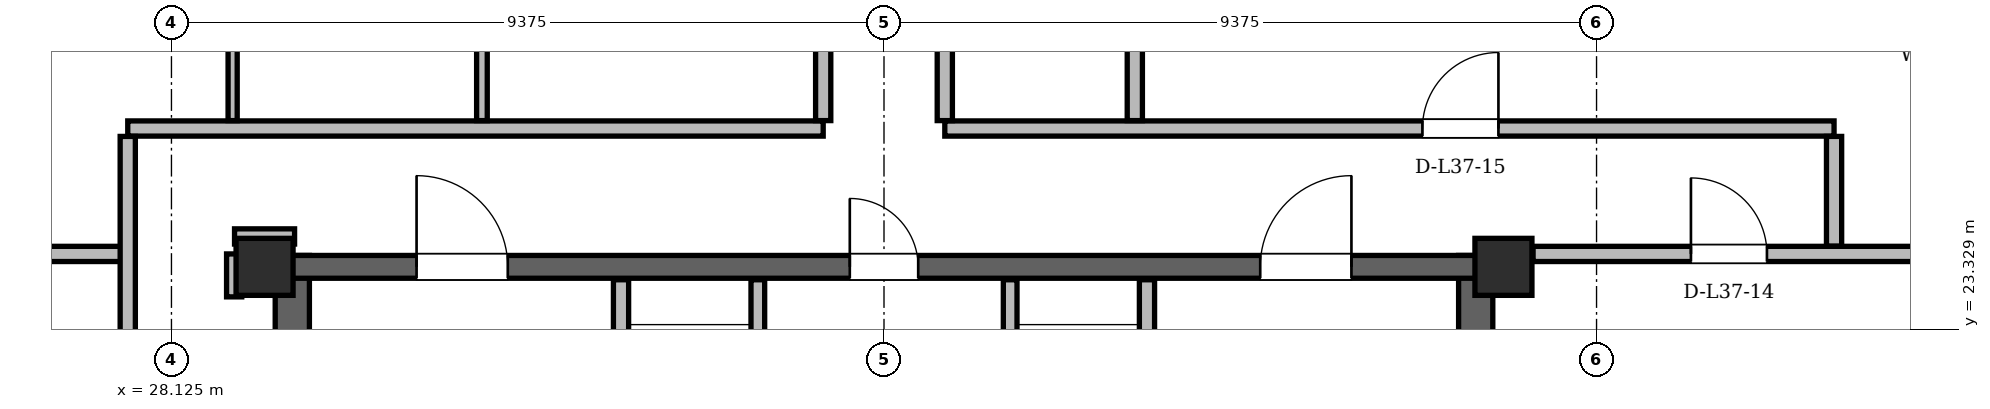
"""IFC4 building model, lengths in metres.
Left out: names, types, materials, properties, quantities, classifications, styles, units other than length and angle.
Written with IfcOpenShell. Run it as: python <this file> out.ifc"""

import sys

from ifc_helpers import new_model, si_unit, direction, frame, frame_2d, origin, origin_2d, place, context, subcontext, project, spatial, rectangle, hollow_rectangle, extrude, element, fill, save


model = new_model("IFC4")
c1 = context("Model", 3, precision=1e-05, world=origin(), true_north=direction((0.0, 1.0)))
c2 = subcontext(c1, "Body", "Model", "MODEL_VIEW")
j1 = project(units=[si_unit("LENGTHUNIT", "METRE"), si_unit("PLANEANGLEUNIT", "RADIAN")], contexts=[c1])
p1 = place(None, origin())
s1 = spatial("IfcSite", under=j1, at=p1, CompositionType="ELEMENT")
p2 = place(p1, origin())
s2 = spatial("IfcBuilding", under=s1, at=p2, CompositionType="ELEMENT")
p3 = place(p2, frame((0.0, 0.0, 142.2)))
s3 = spatial("IfcBuildingStorey", under=s2, at=p3, CompositionType="ELEMENT", Elevation=142.2)
for number, where, z_axis, x_axis in (
    (1, (45.65, 24.15, 0.0), (0.0, 0.0, 1.0), (1.0, 0.0, 0.0)),
    (2, (29.35, 24.15, 0.0), (0.0, 0.0, 1.0), (1.0, 0.0, 0.0)),
):
    element("IfcColumn", number, at=place(p3, frame(where, z_axis=z_axis, x_axis=x_axis)), inside=s3, PredefinedType="COLUMN", context=c2, shape_type="SweptSolid", body=[
        extrude(hollow_rectangle(XDim=0.75, YDim=0.75, WallThickness=0.06, at=origin_2d()), origin(), (0.0, 0.0, 1.0), 3.6),
    ])
for number, where, z_axis, x_axis in (
    (3, (29.715, 11.0, 0.0), (0.0, 0.0, 1.0), (0.0, 1.0, 0.0)),
    (4, (45.285, 11.0, 0.0), (0.0, 0.0, 1.0), (0.0, 1.0, 0.0)),
):
    element("IfcWall", number, at=place(p3, frame(where, z_axis=z_axis, x_axis=x_axis)), inside=s3, PredefinedType="SHEAR", context=c2, shape_type="SweptSolid", body=[
        extrude(rectangle(XDim=13.3, YDim=0.45, at=frame_2d((6.65, 0.0))), origin(), (0.0, 0.0, 1.0), 3.36),
    ])
p4 = place(p3, frame((29.65, 24.15, 0.0), z_axis=(0.0, 0.0, 1.0), x_axis=(1.0, 0.0, 0.0)))
e5 = element("IfcWall", 5, at=p4, inside=s3, PredefinedType="SHEAR", context=c2, shape_type="SweptSolid", body=[
    extrude(rectangle(XDim=15.7, YDim=0.3, at=frame_2d((7.85, 0.0))), origin(), (0.0, 0.0, 1.0), 3.36),
])
p5 = place(p4, frame((1.7, 0.0, 0.0)))
e6 = element("IfcOpeningElement", 6, at=p5, cuts=e5, PredefinedType="OPENING", context=c2, shape_type="SweptSolid", body=[
    extrude(rectangle(XDim=1.2, YDim=2.2, at=frame_2d((0.6, 1.1))), frame((0.0, 0.15, 0.0), z_axis=(0.0, -1.0, 0.0), x_axis=(1.0, 0.0, 0.0)), (0.0, 0.0, 1.0), 0.3),
])
p6 = place(p4, frame((12.8, 0.0, 0.0)))
e7 = element("IfcOpeningElement", 7, at=p6, cuts=e5, PredefinedType="OPENING", context=c2, shape_type="SweptSolid", body=[
    extrude(rectangle(XDim=1.2, YDim=2.2, at=frame_2d((0.6, 1.1))), frame((0.0, 0.15, 0.0), z_axis=(0.0, -1.0, 0.0), x_axis=(1.0, 0.0, 0.0)), (0.0, 0.0, 1.0), 0.3),
])
p7 = place(p4, frame((7.4, 0.0, 0.0)))
e8 = element("IfcOpeningElement", 8, at=p7, cuts=e5, PredefinedType="OPENING", context=c2, shape_type="SweptSolid", body=[
    extrude(rectangle(XDim=0.9, YDim=2.05, at=frame_2d((0.45, 1.025))), frame((0.0, 0.15, 0.0), z_axis=(0.0, -1.0, 0.0), x_axis=(1.0, 0.0, 0.0)), (0.0, 0.0, 1.0), 0.3),
])
p8 = place(p3, frame((60.103, 12.75, 0.0), z_axis=(0.0, 0.0, 1.0), x_axis=(-0.500002563111, 0.866023923966, 0.0)))
e9 = element("IfcWall", 9, at=p8, inside=s3, PredefinedType="SOLIDWALL", context=c2, shape_type="SweptSolid", body=[
    extrude(rectangle(XDim=35.334, YDim=0.34, at=frame_2d((17.667, 0.0))), origin(), (0.0, 0.0, 1.0), 2.58),
])
p9 = place(p8, frame((8.034, 0.0, 0.0)))
e10 = element("IfcOpeningElement", 10, at=p9, cuts=e9, PredefinedType="OPENING", context=c2, shape_type="SweptSolid", body=[
    extrude(rectangle(XDim=1.5, YDim=2.2, at=frame_2d((0.75, 1.1))), frame((0.0, 0.17, 0.0), z_axis=(0.0, -1.0, 0.0), x_axis=(1.0, 0.0, 0.0)), (0.0, 0.0, 1.0), 0.34),
])
p10 = place(p8, frame((27.255, 0.0, 0.0)))
e11 = element("IfcOpeningElement", 11, at=p10, cuts=e9, PredefinedType="OPENING", context=c2, shape_type="SweptSolid", body=[
    extrude(rectangle(XDim=1.5, YDim=2.2, at=frame_2d((0.75, 1.1))), frame((0.0, 0.17, 0.0), z_axis=(0.0, -1.0, 0.0), x_axis=(1.0, 0.0, 0.0)), (0.0, 0.0, 1.0), 0.34),
])
p11 = place(p8, frame((3.622, 0.0, 0.85)))
e12 = element("IfcOpeningElement", 12, at=p11, cuts=e9, PredefinedType="OPENING", context=c2, shape_type="SweptSolid", body=[
    extrude(rectangle(XDim=1.2, YDim=1.48, at=frame_2d((0.6, 0.74))), frame((0.0, 0.17, 0.0), z_axis=(0.0, -1.0, 0.0), x_axis=(1.0, 0.0, 0.0)), (0.0, 0.0, 1.0), 0.34),
])
p12 = place(p8, frame((11.8, 0.0, 0.85)))
e13 = element("IfcOpeningElement", 13, at=p12, cuts=e9, PredefinedType="OPENING", context=c2, shape_type="SweptSolid", body=[
    extrude(rectangle(XDim=1.2, YDim=1.48, at=frame_2d((0.6, 0.74))), frame((0.0, 0.17, 0.0), z_axis=(0.0, -1.0, 0.0), x_axis=(1.0, 0.0, 0.0)), (0.0, 0.0, 1.0), 0.34),
])
p13 = place(p8, frame((15.268, 0.0, 0.85)))
e14 = element("IfcOpeningElement", 14, at=p13, cuts=e9, PredefinedType="OPENING", context=c2, shape_type="SweptSolid", body=[
    extrude(rectangle(XDim=2.8, YDim=1.62, at=frame_2d((1.4, 0.81))), frame((0.0, 0.17, 0.0), z_axis=(0.0, -1.0, 0.0), x_axis=(1.0, 0.0, 0.0)), (0.0, 0.0, 1.0), 0.34),
])
p14 = place(p8, frame((25.555, 0.0, 0.85)))
e15 = element("IfcOpeningElement", 15, at=p14, cuts=e9, PredefinedType="OPENING", context=c2, shape_type="SweptSolid", body=[
    extrude(rectangle(XDim=1.2, YDim=1.48, at=frame_2d((0.6, 0.74))), frame((0.0, 0.17, 0.0), z_axis=(0.0, -1.0, 0.0), x_axis=(1.0, 0.0, 0.0)), (0.0, 0.0, 1.0), 0.34),
])
p15 = place(p8, frame((32.219, 0.0, 0.85)))
e16 = element("IfcOpeningElement", 16, at=p15, cuts=e9, PredefinedType="OPENING", context=c2, shape_type="SweptSolid", body=[
    extrude(rectangle(XDim=2.0, YDim=1.62, at=frame_2d((1.0, 0.81))), frame((0.0, 0.17, 0.0), z_axis=(0.0, -1.0, 0.0), x_axis=(1.0, 0.0, 0.0)), (0.0, 0.0, 1.0), 0.34),
])
p16 = place(p3, frame((32.564, 43.35, 0.0), z_axis=(0.0, 0.0, 1.0), x_axis=(-0.500002563111, -0.866023923966, 0.0)))
e17 = element("IfcWall", 17, at=p16, inside=s3, PredefinedType="SOLIDWALL", context=c2, shape_type="SweptSolid", body=[
    extrude(rectangle(XDim=35.334, YDim=0.34, at=frame_2d((17.667, 0.0))), origin(), (0.0, 0.0, 1.0), 2.58),
])
p17 = place(p16, frame((8.034, 0.0, 0.0)))
e18 = element("IfcOpeningElement", 18, at=p17, cuts=e17, PredefinedType="OPENING", context=c2, shape_type="SweptSolid", body=[
    extrude(rectangle(XDim=1.5, YDim=2.2, at=frame_2d((0.75, 1.1))), frame((0.0, 0.17, 0.0), z_axis=(0.0, -1.0, 0.0), x_axis=(1.0, 0.0, 0.0)), (0.0, 0.0, 1.0), 0.34),
])
p18 = place(p16, frame((26.835, 0.0, 0.0)))
e19 = element("IfcOpeningElement", 19, at=p18, cuts=e17, PredefinedType="OPENING", context=c2, shape_type="SweptSolid", body=[
    extrude(rectangle(XDim=1.5, YDim=2.2, at=frame_2d((0.75, 1.1))), frame((0.0, 0.17, 0.0), z_axis=(0.0, -1.0, 0.0), x_axis=(1.0, 0.0, 0.0)), (0.0, 0.0, 1.0), 0.34),
])
p19 = place(p16, frame((22.185, 0.0, 0.85)))
e20 = element("IfcOpeningElement", 20, at=p19, cuts=e17, PredefinedType="OPENING", context=c2, shape_type="SweptSolid", body=[
    extrude(rectangle(XDim=1.2, YDim=1.48, at=frame_2d((0.6, 0.74))), frame((0.0, 0.17, 0.0), z_axis=(0.0, -1.0, 0.0), x_axis=(1.0, 0.0, 0.0)), (0.0, 0.0, 1.0), 0.34),
])
p20 = place(p16, frame((2.318, 0.0, 0.85)))
e21 = element("IfcOpeningElement", 21, at=p20, cuts=e17, PredefinedType="OPENING", context=c2, shape_type="SweptSolid", body=[
    extrude(rectangle(XDim=1.6, YDim=1.62, at=frame_2d((0.8, 0.81))), frame((0.0, 0.17, 0.0), z_axis=(0.0, -1.0, 0.0), x_axis=(1.0, 0.0, 0.0)), (0.0, 0.0, 1.0), 0.34),
])
p21 = place(p16, frame((12.959, 0.0, 0.85)))
e22 = element("IfcOpeningElement", 22, at=p21, cuts=e17, PredefinedType="OPENING", context=c2, shape_type="SweptSolid", body=[
    extrude(rectangle(XDim=3.0, YDim=1.62, at=frame_2d((1.5, 0.81))), frame((0.0, 0.17, 0.0), z_axis=(0.0, -1.0, 0.0), x_axis=(1.0, 0.0, 0.0)), (0.0, 0.0, 1.0), 0.34),
])
p22 = place(p16, frame((20.293, 0.0, 0.85)))
e23 = element("IfcOpeningElement", 23, at=p22, cuts=e17, PredefinedType="OPENING", context=c2, shape_type="SweptSolid", body=[
    extrude(rectangle(XDim=1.2, YDim=1.48, at=frame_2d((0.6, 0.74))), frame((0.0, 0.17, 0.0), z_axis=(0.0, -1.0, 0.0), x_axis=(1.0, 0.0, 0.0)), (0.0, 0.0, 1.0), 0.34),
])
p23 = place(p16, frame((33.535, 0.0, 0.85)))
e24 = element("IfcOpeningElement", 24, at=p23, cuts=e17, PredefinedType="OPENING", context=c2, shape_type="SweptSolid", body=[
    extrude(rectangle(XDim=1.2, YDim=1.48, at=frame_2d((0.6, 0.74))), frame((0.0, 0.17, 0.0), z_axis=(0.0, -1.0, 0.0), x_axis=(1.0, 0.0, 0.0)), (0.0, 0.0, 1.0), 0.34),
])
p24 = place(p3, frame((34.04, 19.48, 0.0), z_axis=(0.0, 0.0, 1.0), x_axis=(0.0, 1.0, 0.0)))
e25 = element("IfcWall", 25, at=p24, inside=s3, PredefinedType="PARTITIONING", context=c2, shape_type="SweptSolid", body=[
    extrude(rectangle(XDim=4.5, YDim=0.2, at=frame_2d((2.25, 0.0))), origin(), (0.0, 0.0, 1.0), 2.4),
])
p25 = place(p24, frame((2.12, 0.0, 0.0)))
e26 = element("IfcOpeningElement", 26, at=p25, cuts=e25, PredefinedType="OPENING", context=c2, shape_type="SweptSolid", body=[
    extrude(rectangle(XDim=1.1, YDim=2.2, at=frame_2d((0.55, 1.1))), frame((0.0, 0.1, 0.0), z_axis=(0.0, -1.0, 0.0), x_axis=(1.0, 0.0, 0.0)), (0.0, 0.0, 1.0), 0.2),
])
p26 = place(p3, frame((35.84, 20.96, 0.0), z_axis=(0.0, 0.0, 1.0), x_axis=(0.0, 1.0, 0.0)))
e27 = element("IfcWall", 27, at=p26, inside=s3, PredefinedType="PARTITIONING", context=c2, shape_type="SweptSolid", body=[
    extrude(rectangle(XDim=3.02, YDim=0.18, at=frame_2d((1.51, 0.0))), origin(), (0.0, 0.0, 1.0), 2.4),
])
p27 = place(p3, frame((40.96, 19.48, 0.0), z_axis=(0.0, 0.0, 1.0), x_axis=(0.0, 1.0, 0.0)))
e28 = element("IfcWall", 28, at=p27, inside=s3, PredefinedType="PARTITIONING", context=c2, shape_type="SweptSolid", body=[
    extrude(rectangle(XDim=4.5, YDim=0.2, at=frame_2d((2.25, 0.0))), origin(), (0.0, 0.0, 1.0), 2.4),
])
p28 = place(p27, frame((2.12, 0.0, 0.0)))
e29 = element("IfcOpeningElement", 29, at=p28, cuts=e28, PredefinedType="OPENING", context=c2, shape_type="SweptSolid", body=[
    extrude(rectangle(XDim=1.1, YDim=2.2, at=frame_2d((0.55, 1.1))), frame((0.0, 0.1, 0.0), z_axis=(0.0, -1.0, 0.0), x_axis=(1.0, 0.0, 0.0)), (0.0, 0.0, 1.0), 0.2),
])
p29 = place(p3, frame((39.16, 20.96, 0.0), z_axis=(0.0, 0.0, 1.0), x_axis=(0.0, 1.0, 0.0)))
e30 = element("IfcWall", 30, at=p29, inside=s3, PredefinedType="PARTITIONING", context=c2, shape_type="SweptSolid", body=[
    extrude(rectangle(XDim=3.02, YDim=0.18, at=frame_2d((1.51, 0.0))), origin(), (0.0, 0.0, 1.0), 2.4),
])
p30 = place(p3, frame((21.778, 24.32, 0.0), z_axis=(0.0, 0.0, 1.0), x_axis=(1.0, 0.0, 0.0)))
e31 = element("IfcWall", 31, at=p30, inside=s3, PredefinedType="PARTITIONING", context=c2, shape_type="SweptSolid", body=[
    extrude(rectangle(XDim=5.772, YDim=0.2, at=frame_2d((2.886, 0.0))), origin(), (0.0, 0.0, 1.0), 3.36),
])
p31 = place(p3, frame((46.04, 24.32, 0.0), z_axis=(0.0, 0.0, 1.0), x_axis=(1.0, 0.0, 0.0)))
e32 = element("IfcWall", 32, at=p31, inside=s3, PredefinedType="PARTITIONING", context=c2, shape_type="SweptSolid", body=[
    extrude(rectangle(XDim=7.182, YDim=0.2, at=frame_2d((3.591, 0.0))), origin(), (0.0, 0.0, 1.0), 3.36),
])
p32 = place(p31, frame((2.077, 0.0, 0.0)))
e33 = element("IfcOpeningElement", 33, at=p32, cuts=e32, PredefinedType="OPENING", context=c2, shape_type="SweptSolid", body=[
    extrude(rectangle(XDim=1.0, YDim=2.18, at=frame_2d((0.5, 1.09))), frame((0.0, 0.1, 0.0), z_axis=(0.0, -1.0, 0.0), x_axis=(1.0, 0.0, 0.0)), (0.0, 0.0, 1.0), 0.2),
])
p33 = place(p3, frame((28.955, 24.55, 0.0), z_axis=(0.0, 0.0, 1.0), x_axis=(1.0, 0.0, 0.0)))
e34 = element("IfcWall", 34, at=p33, inside=s3, PredefinedType="PARTITIONING", context=c2, shape_type="SweptSolid", body=[
    extrude(rectangle(XDim=0.79, YDim=0.2, at=frame_2d((0.395, 0.0))), origin(), (0.0, 0.0, 1.0), 2.822),
])
p34 = place(p3, frame((27.55, 25.97, 0.0), z_axis=(0.0, 0.0, 1.0), x_axis=(1.0, 0.0, 0.0)))
e35 = element("IfcWall", 35, at=p34, inside=s3, PredefinedType="PARTITIONING", context=c2, shape_type="SweptSolid", body=[
    extrude(rectangle(XDim=9.15, YDim=0.2, at=frame_2d((4.575, 0.0))), origin(), (0.0, 0.0, 1.0), 2.822),
])
p35 = place(p3, frame((38.3, 25.97, 0.0), z_axis=(0.0, 0.0, 1.0), x_axis=(1.0, 0.0, 0.0)))
e36 = element("IfcWall", 36, at=p35, inside=s3, PredefinedType="PARTITIONING", context=c2, shape_type="SweptSolid", body=[
    extrude(rectangle(XDim=11.7, YDim=0.2, at=frame_2d((5.85, 0.0))), origin(), (0.0, 0.0, 1.0), 2.822),
])
p36 = place(p35, frame((6.284, 0.0, 0.0)))
e37 = element("IfcOpeningElement", 37, at=p36, cuts=e36, PredefinedType="OPENING", context=c2, shape_type="SweptSolid", body=[
    extrude(rectangle(XDim=1.0, YDim=2.18, at=frame_2d((0.5, 1.09))), frame((0.0, 0.1, 0.0), z_axis=(0.0, -1.0, 0.0), x_axis=(1.0, 0.0, 0.0)), (0.0, 0.0, 1.0), 0.2),
])
p37 = place(p3, frame((27.55, 18.554, 0.0), z_axis=(0.0, 0.0, 1.0), x_axis=(0.0, 1.0, 0.0)))
e38 = element("IfcWall", 38, at=p37, inside=s3, PredefinedType="PARTITIONING", context=c2, shape_type="SweptSolid", body=[
    extrude(rectangle(XDim=7.312, YDim=0.2, at=frame_2d((3.656, 0.0))), origin(), (0.0, 0.0, 1.0), 3.36),
])
p38 = place(p3, frame((28.93, 26.074, 0.0), z_axis=(0.0, 0.0, 1.0), x_axis=(0.0, 1.0, 0.0)))
e39 = element("IfcWall", 39, at=p38, inside=s3, PredefinedType="PARTITIONING", context=c2, shape_type="SweptSolid", body=[
    extrude(rectangle(XDim=1.822, YDim=0.12, at=frame_2d((0.911, 0.0))), origin(), (0.0, 0.0, 1.0), 3.36),
])
p39 = place(p3, frame((28.95, 23.755, 0.0), z_axis=(0.0, 0.0, 1.0), x_axis=(0.0, 1.0, 0.0)))
e40 = element("IfcWall", 40, at=p39, inside=s3, PredefinedType="PARTITIONING", context=c2, shape_type="SweptSolid", body=[
    extrude(rectangle(XDim=0.565, YDim=0.2, at=frame_2d((0.283, 0.0))), origin(), (0.0, 0.0, 1.0), 3.36),
])
p40 = place(p3, frame((32.21, 26.074, 0.0), z_axis=(0.0, 0.0, 1.0), x_axis=(0.0, 1.0, 0.0)))
e41 = element("IfcWall", 41, at=p40, inside=s3, PredefinedType="PARTITIONING", context=c2, shape_type="SweptSolid", body=[
    extrude(rectangle(XDim=1.822, YDim=0.14, at=frame_2d((0.911, 0.0))), origin(), (0.0, 0.0, 1.0), 3.36),
])
p41 = place(p3, frame((36.7, 26.074, 0.0), z_axis=(0.0, 0.0, 1.0), x_axis=(0.0, 1.0, 0.0)))
e42 = element("IfcWall", 42, at=p41, inside=s3, PredefinedType="PARTITIONING", context=c2, shape_type="SweptSolid", body=[
    extrude(rectangle(XDim=17.102, YDim=0.2, at=frame_2d((8.551, 0.0))), origin(), (0.0, 0.0, 1.0), 3.36),
])
p42 = place(p41, frame((7.042, 0.0, 0.0)))
e43 = element("IfcOpeningElement", 43, at=p42, cuts=e42, PredefinedType="OPENING", context=c2, shape_type="SweptSolid", body=[
    extrude(rectangle(XDim=1.0, YDim=2.18, at=frame_2d((0.5, 1.09))), frame((0.0, 0.1, 0.0), z_axis=(0.0, -1.0, 0.0), x_axis=(1.0, 0.0, 0.0)), (0.0, 0.0, 1.0), 0.2),
])
p43 = place(p3, frame((38.3, 26.074, 0.0), z_axis=(0.0, 0.0, 1.0), x_axis=(0.0, 1.0, 0.0)))
e44 = element("IfcWall", 44, at=p43, inside=s3, PredefinedType="PARTITIONING", context=c2, shape_type="SweptSolid", body=[
    extrude(rectangle(XDim=13.422, YDim=0.2, at=frame_2d((6.711, 0.0))), origin(), (0.0, 0.0, 1.0), 3.36),
])
p44 = place(p43, frame((8.528, 0.0, 0.0)))
e45 = element("IfcOpeningElement", 45, at=p44, cuts=e44, PredefinedType="OPENING", context=c2, shape_type="SweptSolid", body=[
    extrude(rectangle(XDim=1.0, YDim=2.18, at=frame_2d((0.5, 1.09))), frame((0.0, 0.1, 0.0), z_axis=(0.0, -1.0, 0.0), x_axis=(1.0, 0.0, 0.0)), (0.0, 0.0, 1.0), 0.2),
])
p45 = place(p3, frame((40.8, 26.074, 0.0), z_axis=(0.0, 0.0, 1.0), x_axis=(0.0, 1.0, 0.0)))
e46 = element("IfcWall", 46, at=p45, inside=s3, PredefinedType="PARTITIONING", context=c2, shape_type="SweptSolid", body=[
    extrude(rectangle(XDim=17.102, YDim=0.2, at=frame_2d((8.551, 0.0))), origin(), (0.0, 0.0, 1.0), 3.36),
])
p46 = place(p3, frame((50.0, 24.424, 0.0), z_axis=(0.0, 0.0, 1.0), x_axis=(0.0, 1.0, 0.0)))
e47 = element("IfcWall", 47, at=p46, inside=s3, PredefinedType="PARTITIONING", context=c2, shape_type="SweptSolid", body=[
    extrude(rectangle(XDim=1.442, YDim=0.2, at=frame_2d((0.721, 0.0))), origin(), (0.0, 0.0, 1.0), 3.36),
])
p47 = place(p5, origin())
e48 = element("IfcDoor", 48, at=p47, inside=s3, OperationType="SINGLE_SWING_LEFT", PredefinedType="DOOR", context=c2, shape_type="SweptSolid", body=[
    extrude(rectangle(XDim=1.2, YDim=2.2, at=frame_2d((0.6, 1.1))), frame((0.0, 0.025, 0.0), z_axis=(0.0, -1.0, 0.0), x_axis=(1.0, 0.0, 0.0)), (0.0, 0.0, 1.0), 0.05),
])
fill(e6, e48)
p48 = place(p6, origin())
e49 = element("IfcDoor", 49, at=p48, inside=s3, OperationType="SINGLE_SWING_RIGHT", PredefinedType="DOOR", context=c2, shape_type="SweptSolid", body=[
    extrude(rectangle(XDim=1.2, YDim=2.2, at=frame_2d((0.6, 1.1))), frame((0.0, 0.025, 0.0), z_axis=(0.0, -1.0, 0.0), x_axis=(1.0, 0.0, 0.0)), (0.0, 0.0, 1.0), 0.05),
])
fill(e7, e49)
p49 = place(p7, origin())
e50 = element("IfcDoor", 50, at=p49, inside=s3, OperationType="SINGLE_SWING_LEFT", PredefinedType="DOOR", context=c2, shape_type="SweptSolid", body=[
    extrude(rectangle(XDim=0.9, YDim=2.05, at=frame_2d((0.45, 1.025))), frame((0.0, 0.025, 0.0), z_axis=(0.0, -1.0, 0.0), x_axis=(1.0, 0.0, 0.0)), (0.0, 0.0, 1.0), 0.05),
])
fill(e8, e50)
p50 = place(p32, origin())
e51 = element("IfcDoor", 51, at=p50, inside=s3, OperationType="SINGLE_SWING_LEFT", PredefinedType="DOOR", context=c2, shape_type="SweptSolid", body=[
    extrude(rectangle(XDim=1.0, YDim=2.18, at=frame_2d((0.5, 1.09))), frame((0.0, 0.025, 0.0), z_axis=(0.0, -1.0, 0.0), x_axis=(1.0, 0.0, 0.0)), (0.0, 0.0, 1.0), 0.05),
])
fill(e33, e51)
p51 = place(p36, origin())
e52 = element("IfcDoor", 52, at=p51, inside=s3, OperationType="SINGLE_SWING_RIGHT", PredefinedType="DOOR", context=c2, shape_type="SweptSolid", body=[
    extrude(rectangle(XDim=1.0, YDim=2.18, at=frame_2d((0.5, 1.09))), frame((0.0, 0.025, 0.0), z_axis=(0.0, -1.0, 0.0), x_axis=(1.0, 0.0, 0.0)), (0.0, 0.0, 1.0), 0.05),
])
fill(e37, e52)
save(model, sys.argv[1])
